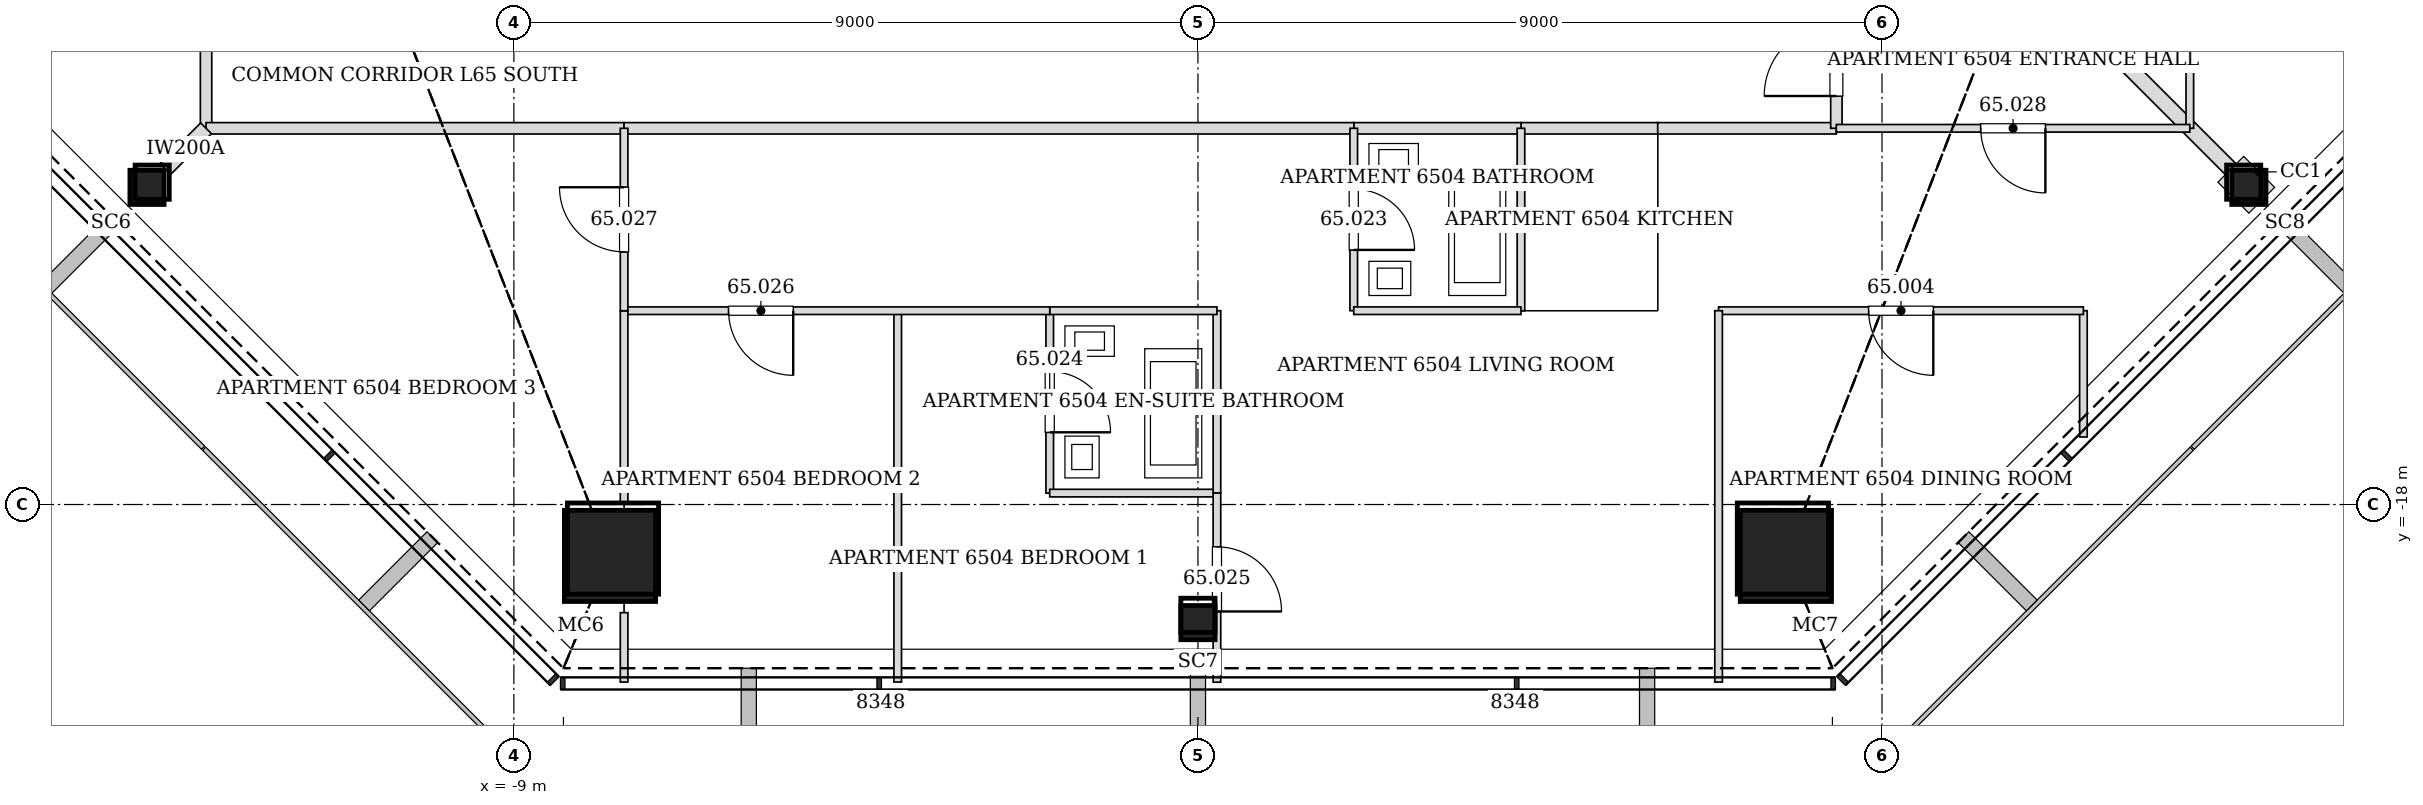
"""IFC4 building model, lengths in metres.
Left out: names, types, materials, properties, quantities, classifications, styles, units other than length and angle.
Written with IfcOpenShell. Run it as: python <this file> out.ifc"""

import sys

from ifc_helpers import new_model, si_unit, direction, frame, frame_2d, origin, origin_2d, place, context, subcontext, project, spatial, rectangle, hollow_rectangle, extrude, element, fill, save


model = new_model("IFC4")
c1 = context("Model", 3, precision=1e-05, world=origin(), true_north=direction((0.0, 1.0)))
c2 = subcontext(c1, "Body", "Model", "MODEL_VIEW")
j1 = project(units=[si_unit("LENGTHUNIT", "METRE"), si_unit("PLANEANGLEUNIT", "RADIAN")], contexts=[c1])
p1 = place(None, origin())
s1 = spatial("IfcSite", under=j1, at=p1, CompositionType="ELEMENT")
p2 = place(p1, origin())
s2 = spatial("IfcBuilding", under=s1, at=p2, CompositionType="ELEMENT")
p3 = place(p2, frame((0.0, 0.0, 270.8)))
s3 = spatial("IfcBuildingStorey", under=s2, at=p3, CompositionType="ELEMENT", Elevation=270.8)
for number, where, z_axis, x_axis in (
    (1, (-7.736, -18.676, 0.0), (0.012, 0.028, 1.0), (-0.924, 0.382, 0.0)),
    (2, (7.736, -18.676, 0.0), (-0.012, 0.028, 1.0), (-0.924, -0.382, 0.0)),
):
    element("IfcColumn", number, at=place(p3, frame(where, z_axis=z_axis, x_axis=x_axis)), inside=s3, PredefinedType="COLUMN", context=c2, shape_type="SweptSolid", body=[
        extrude(hollow_rectangle(XDim=1.2, YDim=1.2, WallThickness=0.055, at=origin_2d()), origin(), (0.0, 0.0, 1.0), 3.402),
    ])
for number, where, z_axis, x_axis in (
    (3, (-13.827, -13.827, 0.0), (0.02, 0.02, 1.0), (-0.707, 0.707, 0.0)),
    (4, (0.0, -19.554, 0.0), (0.0, 0.028, 1.0), (-1.0, 0.0, 0.0)),
    (5, (13.827, -13.827, 0.0), (-0.02, 0.02, 1.0), (-0.707, -0.707, 0.0)),
):
    element("IfcColumn", number, at=place(p3, frame(where, z_axis=z_axis, x_axis=x_axis)), inside=s3, PredefinedType="COLUMN", context=c2, shape_type="SweptSolid", body=[
        extrude(hollow_rectangle(XDim=0.45, YDim=0.45, WallThickness=0.02, at=origin_2d()), origin(), (0.0, 0.0, 1.0), 3.401),
    ])
p4 = place(p3, frame((-13.05, -7.549, 0.0), z_axis=(0.0, 0.0, 1.0), x_axis=(0.0, -1.0, 0.0)))
e6 = element("IfcWall", 6, at=p4, inside=s3, PredefinedType="PARTITIONING", context=c2, shape_type="SweptSolid", body=[
    extrude(rectangle(XDim=5.501, YDim=0.15, at=frame_2d((2.75, 0.0))), origin(), (0.0, 0.0, 1.0), 2.349),
])
p5 = place(p3, frame((4.249, -13.05, 0.0), z_axis=(0.0, 0.0, 1.0), x_axis=(1.0, 0.0, 0.0)))
e7 = element("IfcWall", 7, at=p5, inside=s3, PredefinedType="PARTITIONING", context=c2, shape_type="SweptSolid", body=[
    extrude(rectangle(XDim=1.802, YDim=0.15, at=frame_2d((0.901, 0.0))), origin(), (0.0, 0.0, 1.0), 3.2),
])
p6 = place(p3, frame((2.049, -13.05, 0.0), z_axis=(0.0, 0.0, 1.0), x_axis=(1.0, 0.0, 0.0)))
e8 = element("IfcWall", 8, at=p6, inside=s3, PredefinedType="PARTITIONING", context=c2, shape_type="SweptSolid", body=[
    extrude(rectangle(XDim=2.202, YDim=0.15, at=frame_2d((1.101, 0.0))), origin(), (0.0, 0.0, 1.0), 3.2),
])
p7 = place(p3, frame((-13.05, -13.05, 0.0), z_axis=(0.0, 0.0, 1.0), x_axis=(1.0, 0.0, 0.0)))
e9 = element("IfcWall", 9, at=p7, inside=s3, PredefinedType="PARTITIONING", context=c2, shape_type="SweptSolid", body=[
    extrude(rectangle(XDim=5.501, YDim=0.15, at=frame_2d((2.75, 0.0))), origin(), (0.0, 0.0, 1.0), 2.349),
])
p8 = place(p3, frame((-7.551, -13.05, 0.0), z_axis=(0.0, 0.0, 1.0), x_axis=(1.0, 0.0, 0.0)))
e10 = element("IfcWall", 10, at=p8, inside=s3, PredefinedType="PARTITIONING", context=c2, shape_type="SweptSolid", body=[
    extrude(rectangle(XDim=9.602, YDim=0.15, at=frame_2d((4.801, 0.0))), origin(), (0.0, 0.0, 1.0), 2.344),
])
p9 = place(p3, frame((6.049, -13.05, 0.0), z_axis=(0.0, 0.0, 1.0), x_axis=(1.0, 0.0, 0.0)))
e11 = element("IfcWall", 11, at=p9, inside=s3, PredefinedType="PARTITIONING", context=c2, shape_type="SweptSolid", body=[
    extrude(rectangle(XDim=2.351, YDim=0.15, at=frame_2d((1.175, 0.0))), origin(), (0.0, 0.0, 1.0), 3.2),
])
p10 = place(p3, frame((8.4, -13.05, 0.0), z_axis=(0.0, 0.0, 1.0), x_axis=(0.0, 1.0, 0.0)))
e12 = element("IfcWall", 12, at=p10, inside=s3, PredefinedType="PARTITIONING", context=c2, shape_type="SweptSolid", body=[
    extrude(rectangle(XDim=1.8, YDim=0.15, at=frame_2d((0.9, 0.0))), origin(), (0.0, 0.0, 1.0), 3.2),
])
p11 = place(p10, frame((0.425, 0.0, 0.0)))
e13 = element("IfcOpeningElement", 13, at=p11, cuts=e12, PredefinedType="OPENING", context=c2, shape_type="SweptSolid", body=[
    extrude(rectangle(XDim=0.95, YDim=2.1, at=frame_2d((0.475, 1.05))), frame((0.0, 0.085, 0.0), z_axis=(0.0, -1.0, 0.0), x_axis=(1.0, 0.0, 0.0)), (0.0, 0.0, 1.0), 0.17),
])
p12 = place(p3, frame((11.65, -17.111, 0.0), z_axis=(0.0, 0.0, 1.0), x_axis=(0.0, 1.0, 0.0)))
e14 = element("IfcWall", 14, at=p12, inside=s3, PredefinedType="PARTITIONING", context=c2, shape_type="SweptSolid", body=[
    extrude(rectangle(XDim=1.661, YDim=0.1, at=frame_2d((0.831, 0.0))), origin(), (0.0, 0.0, 1.0), 2.74),
])
p13 = place(p3, frame((11.65, -15.45, 0.0), z_axis=(0.0, 0.0, 1.0), x_axis=(-1.0, 0.0, 0.0)))
e15 = element("IfcWall", 15, at=p13, inside=s3, PredefinedType="PARTITIONING", context=c2, shape_type="SweptSolid", body=[
    extrude(rectangle(XDim=4.8, YDim=0.1, at=frame_2d((2.4, 0.0))), origin(), (0.0, 0.0, 1.0), 2.349),
])
p14 = place(p13, frame((1.975, 0.0, 0.0)))
e16 = element("IfcOpeningElement", 16, at=p14, cuts=e15, PredefinedType="OPENING", context=c2, shape_type="SweptSolid", body=[
    extrude(rectangle(XDim=0.85, YDim=2.1, at=frame_2d((0.425, 1.05))), frame((0.0, 0.06, 0.0), z_axis=(0.0, -1.0, 0.0), x_axis=(1.0, 0.0, 0.0)), (0.0, 0.0, 1.0), 0.12),
])
p15 = place(p3, frame((6.85, -15.45, 0.0), z_axis=(0.0, 0.0, 1.0), x_axis=(0.0, -1.0, 0.0)))
e17 = element("IfcWall", 17, at=p15, inside=s3, PredefinedType="PARTITIONING", context=c2, shape_type="SweptSolid", body=[
    extrude(rectangle(XDim=4.886, YDim=0.1, at=frame_2d((2.443, 0.0))), origin(), (0.0, 0.0, 1.0), 2.591),
])
p16 = place(p3, frame((13.586, -13.586, 0.0), z_axis=(0.0, 0.0, 1.0), x_axis=(-0.707106781187, 0.707106781187, 0.0)))
e18 = element("IfcWall", 18, at=p16, inside=s3, PredefinedType="PARTITIONING", context=c2, shape_type="SweptSolid", body=[
    extrude(rectangle(XDim=3.277, YDim=0.2, at=frame_2d((1.638, 0.0))), origin(), (0.0, 0.0, 1.0), 2.591),
])
p17 = place(p3, frame((13.05, -6.05, 0.0), z_axis=(0.0, 0.0, 1.0), x_axis=(0.0, -1.0, 0.0)))
e19 = element("IfcWall", 19, at=p17, inside=s3, PredefinedType="PARTITIONING", context=c2, shape_type="SweptSolid", body=[
    extrude(rectangle(XDim=7.0, YDim=0.1, at=frame_2d((3.5, 0.0))), origin(), (0.0, 0.0, 1.0), 2.349),
])
p18 = place(p17, frame((3.075, 0.0, 0.0)))
e20 = element("IfcOpeningElement", 20, at=p18, cuts=e19, PredefinedType="OPENING", context=c2, shape_type="SweptSolid", body=[
    extrude(rectangle(XDim=0.85, YDim=2.1, at=frame_2d((0.425, 1.05))), frame((0.0, 0.06, 0.0), z_axis=(0.0, -1.0, 0.0), x_axis=(1.0, 0.0, 0.0)), (0.0, 0.0, 1.0), 0.12),
])
p19 = place(p3, frame((-13.586, -13.586, 0.0), z_axis=(0.0, 0.0, 1.0), x_axis=(0.707106781187, 0.707106781187, 0.0)))
e21 = element("IfcWall", 21, at=p19, inside=s3, PredefinedType="PARTITIONING", context=c2, shape_type="SweptSolid", body=[
    extrude(rectangle(XDim=0.758, YDim=0.2, at=frame_2d((0.379, 0.0))), origin(), (0.0, 0.0, 1.0), 2.591),
])
p20 = place(p3, frame((4.25, -13.05, 0.0), z_axis=(0.0, 0.0, 1.0), x_axis=(0.0, -1.0, 0.0)))
e22 = element("IfcWall", 22, at=p20, inside=s3, PredefinedType="PARTITIONING", context=c2, shape_type="SweptSolid", body=[
    extrude(rectangle(XDim=2.4, YDim=0.1, at=frame_2d((1.2, 0.0))), origin(), (0.0, 0.0, 1.0), 2.591),
])
p21 = place(p3, frame((2.05, -13.05, 0.0), z_axis=(0.0, 0.0, 1.0), x_axis=(0.0, -1.0, 0.0)))
e23 = element("IfcWall", 23, at=p21, inside=s3, PredefinedType="PARTITIONING", context=c2, shape_type="SweptSolid", body=[
    extrude(rectangle(XDim=2.4, YDim=0.1, at=frame_2d((1.2, 0.0))), origin(), (0.0, 0.0, 1.0), 2.591),
])
p22 = place(p21, frame((0.8, 0.0, 0.0)))
e24 = element("IfcOpeningElement", 24, at=p22, cuts=e23, PredefinedType="OPENING", context=c2, shape_type="SweptSolid", body=[
    extrude(rectangle(XDim=0.8, YDim=2.1, at=frame_2d((0.4, 1.05))), frame((0.0, 0.06, 0.0), z_axis=(0.0, -1.0, 0.0), x_axis=(1.0, 0.0, 0.0)), (0.0, 0.0, 1.0), 0.12),
])
p23 = place(p3, frame((2.05, -15.45, 0.0), z_axis=(0.0, 0.0, 1.0), x_axis=(1.0, 0.0, 0.0)))
e25 = element("IfcWall", 25, at=p23, inside=s3, PredefinedType="PARTITIONING", context=c2, shape_type="SweptSolid", body=[
    extrude(rectangle(XDim=2.2, YDim=0.1, at=frame_2d((1.1, 0.0))), origin(), (0.0, 0.0, 1.0), 3.2),
])
p24 = place(p3, frame((-1.95, -15.45, 0.0), z_axis=(0.0, 0.0, 1.0), x_axis=(0.0, -1.0, 0.0)))
e26 = element("IfcWall", 26, at=p24, inside=s3, PredefinedType="PARTITIONING", context=c2, shape_type="SweptSolid", body=[
    extrude(rectangle(XDim=2.4, YDim=0.1, at=frame_2d((1.2, 0.0))), origin(), (0.0, 0.0, 1.0), 2.591),
])
p25 = place(p24, frame((0.8, 0.0, 0.0)))
e27 = element("IfcOpeningElement", 27, at=p25, cuts=e26, PredefinedType="OPENING", context=c2, shape_type="SweptSolid", body=[
    extrude(rectangle(XDim=0.8, YDim=2.1, at=frame_2d((0.4, 1.05))), frame((0.0, 0.06, 0.0), z_axis=(0.0, -1.0, 0.0), x_axis=(1.0, 0.0, 0.0)), (0.0, 0.0, 1.0), 0.12),
])
p26 = place(p3, frame((-1.95, -17.85, 0.0), z_axis=(0.0, 0.0, 1.0), x_axis=(1.0, 0.0, 0.0)))
e28 = element("IfcWall", 28, at=p26, inside=s3, PredefinedType="PARTITIONING", context=c2, shape_type="SweptSolid", body=[
    extrude(rectangle(XDim=2.2, YDim=0.1, at=frame_2d((1.1, 0.0))), origin(), (0.0, 0.0, 1.0), 2.344),
])
p27 = place(p3, frame((0.25, -17.85, 0.0), z_axis=(0.0, 0.0, 1.0), x_axis=(0.0, 1.0, 0.0)))
e29 = element("IfcWall", 29, at=p27, inside=s3, PredefinedType="PARTITIONING", context=c2, shape_type="SweptSolid", body=[
    extrude(rectangle(XDim=2.4, YDim=0.1, at=frame_2d((1.2, 0.0))), origin(), (0.0, 0.0, 1.0), 2.591),
])
p28 = place(p3, frame((0.25, -15.45, 0.0), z_axis=(0.0, 0.0, 1.0), x_axis=(-1.0, 0.0, 0.0)))
e30 = element("IfcWall", 30, at=p28, inside=s3, PredefinedType="PARTITIONING", context=c2, shape_type="SweptSolid", body=[
    extrude(rectangle(XDim=2.2, YDim=0.1, at=frame_2d((1.1, 0.0))), origin(), (0.0, 0.0, 1.0), 2.344),
])
p29 = place(p3, frame((-3.95, -15.45, 0.0), z_axis=(0.0, 0.0, 1.0), x_axis=(0.0, -1.0, 0.0)))
e31 = element("IfcWall", 31, at=p29, inside=s3, PredefinedType="PARTITIONING", context=c2, shape_type="SweptSolid", body=[
    extrude(rectangle(XDim=4.886, YDim=0.1, at=frame_2d((2.443, 0.0))), origin(), (0.0, 0.0, 1.0), 2.591),
])
p30 = place(p3, frame((-1.95, -15.45, 0.0), z_axis=(0.0, 0.0, 1.0), x_axis=(-1.0, 0.0, 0.0)))
e32 = element("IfcWall", 32, at=p30, inside=s3, PredefinedType="PARTITIONING", context=c2, shape_type="SweptSolid", body=[
    extrude(rectangle(XDim=5.6, YDim=0.1, at=frame_2d((2.8, 0.0))), origin(), (0.0, 0.0, 1.0), 3.2),
])
p31 = place(p30, frame((3.375, 0.0, 0.0)))
e33 = element("IfcOpeningElement", 33, at=p31, cuts=e32, PredefinedType="OPENING", context=c2, shape_type="SweptSolid", body=[
    extrude(rectangle(XDim=0.85, YDim=2.1, at=frame_2d((0.425, 1.05))), frame((0.0, 0.06, 0.0), z_axis=(0.0, -1.0, 0.0), x_axis=(1.0, 0.0, 0.0)), (0.0, 0.0, 1.0), 0.12),
])
p32 = place(p3, frame((0.25, -20.338, 0.0), z_axis=(0.0, 0.0, 1.0), x_axis=(0.0, 1.0, 0.0)))
e34 = element("IfcWall", 34, at=p32, inside=s3, PredefinedType="PARTITIONING", context=c2, shape_type="SweptSolid", body=[
    extrude(rectangle(XDim=2.488, YDim=0.1, at=frame_2d((1.244, 0.0))), origin(), (0.0, 0.0, 1.0), 2.74),
])
p33 = place(p32, frame((0.931, 0.0, 0.0)))
e35 = element("IfcOpeningElement", 35, at=p33, cuts=e34, PredefinedType="OPENING", context=c2, shape_type="SweptSolid", body=[
    extrude(rectangle(XDim=0.85, YDim=2.1, at=frame_2d((0.425, 1.05))), frame((0.0, 0.06, 0.0), z_axis=(0.0, -1.0, 0.0), x_axis=(1.0, 0.0, 0.0)), (0.0, 0.0, 1.0), 0.12),
])
p34 = place(p3, frame((-7.55, -15.45, 0.0), z_axis=(0.0, 0.0, 1.0), x_axis=(0.0, -1.0, 0.0)))
e36 = element("IfcWall", 36, at=p34, inside=s3, PredefinedType="PARTITIONING", context=c2, shape_type="SweptSolid", body=[
    extrude(rectangle(XDim=2.52, YDim=0.1, at=frame_2d((1.26, 0.0))), origin(), (0.0, 0.0, 1.0), 2.591),
])
p35 = place(p3, frame((-7.55, -19.423, 0.0), z_axis=(0.0, 0.0, 1.0), x_axis=(0.0, -1.0, 0.0)))
e37 = element("IfcWall", 37, at=p35, inside=s3, PredefinedType="PARTITIONING", context=c2, shape_type="SweptSolid", body=[
    extrude(rectangle(XDim=0.913, YDim=0.1, at=frame_2d((0.457, 0.0))), origin(), (0.0, 0.0, 1.0), 3.2),
])
p36 = place(p3, frame((-7.55, -15.451, 0.0), z_axis=(0.0, 0.0, 1.0), x_axis=(0.0, 1.0, 0.0)))
e38 = element("IfcWall", 38, at=p36, inside=s3, PredefinedType="PARTITIONING", context=c2, shape_type="SweptSolid", body=[
    extrude(rectangle(XDim=2.401, YDim=0.1, at=frame_2d((1.2, 0.0))), origin(), (0.0, 0.0, 1.0), 2.591),
])
p37 = place(p36, frame((0.775, 0.0, 0.0)))
e39 = element("IfcOpeningElement", 39, at=p37, cuts=e38, PredefinedType="OPENING", context=c2, shape_type="SweptSolid", body=[
    extrude(rectangle(XDim=0.85, YDim=2.1, at=frame_2d((0.425, 1.05))), frame((0.0, 0.06, 0.0), z_axis=(0.0, -1.0, 0.0), x_axis=(1.0, 0.0, 0.0)), (0.0, 0.0, 1.0), 0.12),
])
p38 = place(p3, frame((13.05, -13.05, 0.0), z_axis=(0.0, 0.0, 1.0), x_axis=(-1.0, 0.0, 0.0)))
e40 = element("IfcWall", 40, at=p38, inside=s3, PredefinedType="PARTITIONING", context=c2, shape_type="SweptSolid", body=[
    extrude(rectangle(XDim=4.651, YDim=0.1, at=frame_2d((2.326, 0.0))), origin(), (0.0, 0.0, 1.0), 2.349),
])
p39 = place(p38, frame((1.9, 0.0, 0.0)))
e41 = element("IfcOpeningElement", 41, at=p39, cuts=e40, PredefinedType="OPENING", context=c2, shape_type="SweptSolid", body=[
    extrude(rectangle(XDim=0.85, YDim=2.1, at=frame_2d((0.425, 1.05))), frame((0.0, 0.06, 0.0), z_axis=(0.0, -1.0, 0.0), x_axis=(1.0, 0.0, 0.0)), (0.0, 0.0, 1.0), 0.12),
])
p40 = place(p14, origin())
e42 = element("IfcDoor", 42, at=p40, inside=s3, OperationType="SINGLE_SWING_LEFT", PredefinedType="DOOR", context=c2, shape_type="SweptSolid", body=[
    extrude(rectangle(XDim=0.85, YDim=2.1, at=frame_2d((0.425, 1.05))), frame((0.0, 0.025, 0.0), z_axis=(0.0, -1.0, 0.0), x_axis=(1.0, 0.0, 0.0)), (0.0, 0.0, 1.0), 0.05),
])
fill(e16, e42)
p41 = place(p22, origin())
e43 = element("IfcDoor", 43, at=p41, inside=s3, OperationType="SINGLE_SWING_RIGHT", PredefinedType="DOOR", context=c2, shape_type="SweptSolid", body=[
    extrude(rectangle(XDim=0.8, YDim=2.1, at=frame_2d((0.4, 1.05))), frame((0.0, 0.025, 0.0), z_axis=(0.0, -1.0, 0.0), x_axis=(1.0, 0.0, 0.0)), (0.0, 0.0, 1.0), 0.05),
])
fill(e24, e43)
p42 = place(p25, origin())
e44 = element("IfcDoor", 44, at=p42, inside=s3, OperationType="SINGLE_SWING_RIGHT", PredefinedType="DOOR", context=c2, shape_type="SweptSolid", body=[
    extrude(rectangle(XDim=0.8, YDim=2.1, at=frame_2d((0.4, 1.05))), frame((0.0, 0.025, 0.0), z_axis=(0.0, -1.0, 0.0), x_axis=(1.0, 0.0, 0.0)), (0.0, 0.0, 1.0), 0.05),
])
fill(e27, e44)
p43 = place(p33, frame((0.85, 0.0, 0.0), z_axis=(0.0, 0.0, 1.0), x_axis=(-1.0, 0.0, 0.0)))
e45 = element("IfcDoor", 45, at=p43, inside=s3, OperationType="SINGLE_SWING_RIGHT", PredefinedType="DOOR", context=c2, shape_type="SweptSolid", body=[
    extrude(rectangle(XDim=0.85, YDim=2.1, at=frame_2d((0.425, 1.05))), frame((0.0, 0.025, 0.0), z_axis=(0.0, -1.0, 0.0), x_axis=(1.0, 0.0, 0.0)), (0.0, 0.0, 1.0), 0.05),
])
fill(e35, e45)
p44 = place(p31, origin())
e46 = element("IfcDoor", 46, at=p44, inside=s3, OperationType="SINGLE_SWING_LEFT", PredefinedType="DOOR", context=c2, shape_type="SweptSolid", body=[
    extrude(rectangle(XDim=0.85, YDim=2.1, at=frame_2d((0.425, 1.05))), frame((0.0, 0.025, 0.0), z_axis=(0.0, -1.0, 0.0), x_axis=(1.0, 0.0, 0.0)), (0.0, 0.0, 1.0), 0.05),
])
fill(e33, e46)
p45 = place(p37, origin())
e47 = element("IfcDoor", 47, at=p45, inside=s3, OperationType="SINGLE_SWING_RIGHT", PredefinedType="DOOR", context=c2, shape_type="SweptSolid", body=[
    extrude(rectangle(XDim=0.85, YDim=2.1, at=frame_2d((0.425, 1.05))), frame((0.0, 0.025, 0.0), z_axis=(0.0, -1.0, 0.0), x_axis=(1.0, 0.0, 0.0)), (0.0, 0.0, 1.0), 0.05),
])
fill(e39, e47)
p46 = place(p39, origin())
e48 = element("IfcDoor", 48, at=p46, inside=s3, OperationType="SINGLE_SWING_LEFT", PredefinedType="DOOR", context=c2, shape_type="SweptSolid", body=[
    extrude(rectangle(XDim=0.85, YDim=2.1, at=frame_2d((0.425, 1.05))), frame((0.0, 0.025, 0.0), z_axis=(0.0, -1.0, 0.0), x_axis=(1.0, 0.0, 0.0)), (0.0, 0.0, 1.0), 0.05),
])
fill(e41, e48)
p47 = place(p11, origin())
e49 = element("IfcDoor", 49, at=p47, inside=s3, OperationType="SINGLE_SWING_LEFT", PredefinedType="DOOR", context=c2, shape_type="SweptSolid", body=[
    extrude(rectangle(XDim=0.95, YDim=2.1, at=frame_2d((0.475, 1.05))), frame((0.0, 0.025, 0.0), z_axis=(0.0, -1.0, 0.0), x_axis=(1.0, 0.0, 0.0)), (0.0, 0.0, 1.0), 0.05),
])
fill(e13, e49)
save(model, sys.argv[1])
